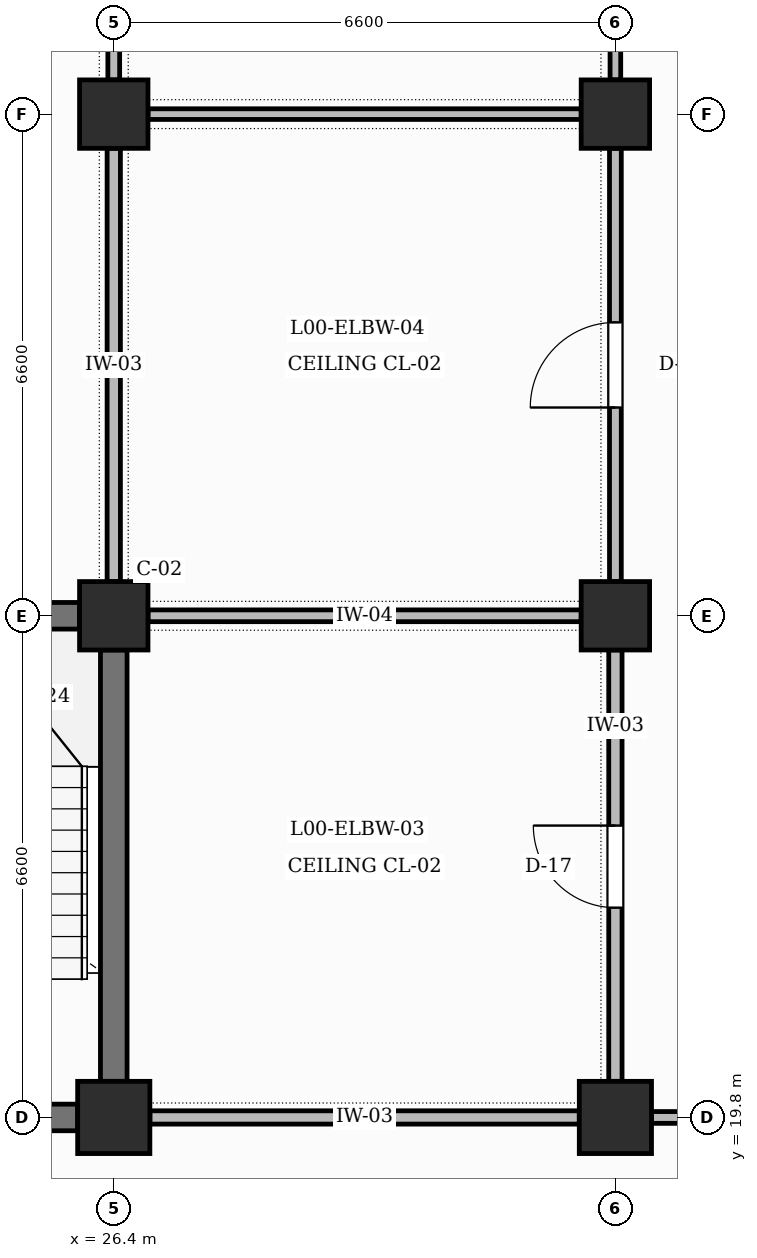
"""IFC4 building model, lengths in metres.
Left out: names, types, materials, properties, quantities, classifications, styles, units other than length and angle.
Written with IfcOpenShell. Run it as: python <this file> out.ifc"""

import sys

from ifc_helpers import new_model, si_unit, direction, frame, frame_2d, origin, origin_2d, place, context, subcontext, project, spatial, rectangle, extrude, element, fill, save


model = new_model("IFC4")
c1 = context("Model", 3, precision=1e-05, world=origin(), true_north=direction((0.0, 1.0)))
c2 = subcontext(c1, "Body", "Model", "MODEL_VIEW")
j1 = project(units=[si_unit("LENGTHUNIT", "METRE"), si_unit("PLANEANGLEUNIT", "RADIAN")], contexts=[c1])
p1 = place(None, origin())
s1 = spatial("IfcSite", under=j1, at=p1, CompositionType="ELEMENT")
p2 = place(p1, origin())
s2 = spatial("IfcBuilding", under=s1, at=p2, CompositionType="ELEMENT")
p3 = place(p2, origin())
s3 = spatial("IfcBuildingStorey", under=s2, at=p3, CompositionType="ELEMENT", Elevation=0.0)
p4 = place(p3, frame((26.4, 19.8, 0.0), z_axis=(0.0, 0.0, 1.0), x_axis=(1.0, 0.0, 0.0)))
e1 = element("IfcColumn", 1, at=p4, inside=s3, PredefinedType="COLUMN", context=c2, shape_type="SweptSolid", body=[
    extrude(rectangle(XDim=0.95, YDim=0.95, at=origin_2d()), origin(), (0.0, 0.0, 1.0), 5.4),
])
for number, where, z_axis, x_axis in (
    (2, (26.4, 26.4, 0.0), (0.0, 0.0, 1.0), (1.0, 0.0, 0.0)),
    (3, (26.4, 33.0, 0.0), (0.0, 0.0, 1.0), (1.0, 0.0, 0.0)),
):
    element("IfcColumn", number, at=place(p3, frame(where, z_axis=z_axis, x_axis=x_axis)), inside=s3, PredefinedType="COLUMN", context=c2, shape_type="SweptSolid", body=[
        extrude(rectangle(XDim=0.9, YDim=0.9, at=origin_2d()), origin(), (0.0, 0.0, 1.0), 5.4),
    ])
p5 = place(p3, frame((33.0, 19.8, 0.0), z_axis=(0.0, 0.0, 1.0), x_axis=(1.0, 0.0, 0.0)))
e4 = element("IfcColumn", 4, at=p5, inside=s3, PredefinedType="COLUMN", context=c2, shape_type="SweptSolid", body=[
    extrude(rectangle(XDim=0.95, YDim=0.95, at=origin_2d()), origin(), (0.0, 0.0, 1.0), 5.4),
])
for number, where, z_axis, x_axis in (
    (5, (33.0, 26.4, 0.0), (0.0, 0.0, 1.0), (1.0, 0.0, 0.0)),
    (6, (33.0, 33.0, 0.0), (0.0, 0.0, 1.0), (1.0, 0.0, 0.0)),
):
    element("IfcColumn", number, at=place(p3, frame(where, z_axis=z_axis, x_axis=x_axis)), inside=s3, PredefinedType="COLUMN", context=c2, shape_type="SweptSolid", body=[
        extrude(rectangle(XDim=0.9, YDim=0.9, at=origin_2d()), origin(), (0.0, 0.0, 1.0), 5.4),
    ])
p6 = place(p3, frame((20.275, 19.8, 0.0), z_axis=(0.0, 0.0, 1.0), x_axis=(1.0, 0.0, 0.0)))
e7 = element("IfcWall", 7, at=p6, inside=s3, PredefinedType="SHEAR", context=c2, shape_type="SweptSolid", body=[
    extrude(rectangle(XDim=5.65, YDim=0.35, at=frame_2d((2.825, 0.0))), origin(), (0.0, 0.0, 1.0), 4.2),
])
p7 = place(p6, frame((2.25, 0.0, 0.0)))
e8 = element("IfcOpeningElement", 8, at=p7, cuts=e7, PredefinedType="OPENING", context=c2, shape_type="SweptSolid", body=[
    extrude(rectangle(XDim=1.15, YDim=2.2, at=frame_2d((0.575, 1.1))), frame((0.0, 0.185, 0.0), z_axis=(0.0, -1.0, 0.0), x_axis=(1.0, 0.0, 0.0)), (0.0, 0.0, 1.0), 0.37),
])
for number, where, z_axis, x_axis in (
    (9, (20.275, 26.4, 0.0), (0.0, 0.0, 1.0), (1.0, 0.0, 0.0)),
    (10, (26.4, 20.275, 0.0), (0.0, 0.0, 1.0), (0.0, 1.0, 0.0)),
):
    element("IfcWall", number, at=place(p3, frame(where, z_axis=z_axis, x_axis=x_axis)), inside=s3, PredefinedType="SHEAR", context=c2, shape_type="SweptSolid", body=[
        extrude(rectangle(XDim=5.675, YDim=0.35, at=frame_2d((2.837, 0.0))), origin(), (0.0, 0.0, 1.0), 4.3),
    ])
p8 = place(p3, frame((26.4, 26.85, 0.0), z_axis=(0.0, 0.0, 1.0), x_axis=(0.0, 1.0, 0.0)))
e11 = element("IfcWall", 11, at=p8, inside=s3, PredefinedType="PARTITIONING", context=c2, shape_type="SweptSolid", body=[
    extrude(rectangle(XDim=5.7, YDim=0.175, at=frame_2d((2.85, 0.0))), origin(), (0.0, 0.0, 1.0), 4.3),
])
p9 = place(p3, frame((26.4, 33.45, 0.0), z_axis=(0.0, 0.0, 1.0), x_axis=(0.0, 1.0, 0.0)))
e12 = element("IfcWall", 12, at=p9, inside=s3, PredefinedType="PARTITIONING", context=c2, shape_type="SweptSolid", body=[
    extrude(rectangle(XDim=5.7, YDim=0.155, at=frame_2d((2.85, 0.0))), origin(), (0.0, 0.0, 1.0), 4.3),
])
p10 = place(p3, frame((26.875, 19.8, 0.0), z_axis=(0.0, 0.0, 1.0), x_axis=(1.0, 0.0, 0.0)))
e13 = element("IfcWall", 13, at=p10, inside=s3, PredefinedType="PARTITIONING", context=c2, shape_type="SweptSolid", body=[
    extrude(rectangle(XDim=5.65, YDim=0.175, at=frame_2d((2.825, 0.0))), origin(), (0.0, 0.0, 1.0), 4.3),
])
p11 = place(p3, frame((33.0, 20.275, 0.0), z_axis=(0.0, 0.0, 1.0), x_axis=(0.0, 1.0, 0.0)))
e14 = element("IfcWall", 14, at=p11, inside=s3, PredefinedType="PARTITIONING", context=c2, shape_type="SweptSolid", body=[
    extrude(rectangle(XDim=5.675, YDim=0.175, at=frame_2d((2.837, 0.0))), origin(), (0.0, 0.0, 1.0), 4.3),
])
p12 = place(p11, frame((2.285, 0.0, 0.0)))
e15 = element("IfcOpeningElement", 15, at=p12, cuts=e14, PredefinedType="OPENING", context=c2, shape_type="SweptSolid", body=[
    extrude(rectangle(XDim=1.08, YDim=2.15, at=frame_2d((0.54, 1.075))), frame((0.0, 0.097, 0.0), z_axis=(0.0, -1.0, 0.0), x_axis=(1.0, 0.0, 0.0)), (0.0, 0.0, 1.0), 0.195),
])
p13 = place(p3, frame((26.85, 26.4, 0.0), z_axis=(0.0, 0.0, 1.0), x_axis=(1.0, 0.0, 0.0)))
e16 = element("IfcWall", 16, at=p13, inside=s3, PredefinedType="PARTITIONING", context=c2, shape_type="SweptSolid", body=[
    extrude(rectangle(XDim=5.7, YDim=0.155, at=frame_2d((2.85, 0.0))), origin(), (0.0, 0.0, 1.0), 4.2),
])
p14 = place(p3, frame((33.0, 26.85, 0.0), z_axis=(0.0, 0.0, 1.0), x_axis=(0.0, 1.0, 0.0)))
e17 = element("IfcWall", 17, at=p14, inside=s3, PredefinedType="PARTITIONING", context=c2, shape_type="SweptSolid", body=[
    extrude(rectangle(XDim=5.7, YDim=0.155, at=frame_2d((2.85, 0.0))), origin(), (0.0, 0.0, 1.0), 4.3),
])
p15 = place(p14, frame((2.29, 0.0, 0.0)))
e18 = element("IfcOpeningElement", 18, at=p15, cuts=e17, PredefinedType="OPENING", context=c2, shape_type="SweptSolid", body=[
    extrude(rectangle(XDim=1.12, YDim=2.2, at=frame_2d((0.56, 1.1))), frame((0.0, 0.087, 0.0), z_axis=(0.0, -1.0, 0.0), x_axis=(1.0, 0.0, 0.0)), (0.0, 0.0, 1.0), 0.175),
])
p16 = place(p3, frame((26.85, 33.0, 0.0), z_axis=(0.0, 0.0, 1.0), x_axis=(1.0, 0.0, 0.0)))
e19 = element("IfcWall", 19, at=p16, inside=s3, PredefinedType="PARTITIONING", context=c2, shape_type="SweptSolid", body=[
    extrude(rectangle(XDim=5.7, YDim=0.14, at=frame_2d((2.85, 0.0))), origin(), (0.0, 0.0, 1.0), 4.3),
])
p17 = place(p3, frame((33.0, 33.45, 0.0), z_axis=(0.0, 0.0, 1.0), x_axis=(0.0, 1.0, 0.0)))
e20 = element("IfcWall", 20, at=p17, inside=s3, PredefinedType="PARTITIONING", context=c2, shape_type="SweptSolid", body=[
    extrude(rectangle(XDim=5.7, YDim=0.14, at=frame_2d((2.85, 0.0))), origin(), (0.0, 0.0, 1.0), 4.3),
])
p18 = place(p17, frame((2.26, 0.0, 0.0)))
e21 = element("IfcOpeningElement", 21, at=p18, cuts=e20, PredefinedType="OPENING", context=c2, shape_type="SweptSolid", body=[
    extrude(rectangle(XDim=1.18, YDim=2.2, at=frame_2d((0.59, 1.1))), frame((0.0, 0.08, 0.0), z_axis=(0.0, -1.0, 0.0), x_axis=(1.0, 0.0, 0.0)), (0.0, 0.0, 1.0), 0.16),
])
p19 = place(p3, frame((33.475, 19.8, 0.0), z_axis=(0.0, 0.0, 1.0), x_axis=(1.0, 0.0, 0.0)))
e22 = element("IfcWall", 22, at=p19, inside=s3, PredefinedType="PARTITIONING", context=c2, shape_type="SweptSolid", body=[
    extrude(rectangle(XDim=5.675, YDim=0.155, at=frame_2d((2.837, 0.0))), origin(), (0.0, 0.0, 1.0), 4.2),
])
p20 = place(p19, frame((1.925, 0.0, 0.0)))
e23 = element("IfcOpeningElement", 23, at=p20, cuts=e22, PredefinedType="OPENING", context=c2, shape_type="SweptSolid", body=[
    extrude(rectangle(XDim=1.8, YDim=2.3, at=frame_2d((0.9, 1.15))), frame((0.0, 0.087, 0.0), z_axis=(0.0, -1.0, 0.0), x_axis=(1.0, 0.0, 0.0)), (0.0, 0.0, 1.0), 0.175),
])
p21 = place(p12, origin())
e24 = element("IfcDoor", 24, at=p21, inside=s3, OperationType="SINGLE_SWING_RIGHT", PredefinedType="DOOR", context=c2, shape_type="SweptSolid", body=[
    extrude(rectangle(XDim=1.08, YDim=2.15, at=frame_2d((0.54, 1.075))), frame((0.0, 0.025, 0.0), z_axis=(0.0, -1.0, 0.0), x_axis=(1.0, 0.0, 0.0)), (0.0, 0.0, 1.0), 0.05),
])
fill(e15, e24)
p22 = place(p15, origin())
e25 = element("IfcDoor", 25, at=p22, inside=s3, OperationType="SINGLE_SWING_LEFT", PredefinedType="DOOR", context=c2, shape_type="SweptSolid", body=[
    extrude(rectangle(XDim=1.12, YDim=2.2, at=frame_2d((0.56, 1.1))), frame((0.0, 0.025, 0.0), z_axis=(0.0, -1.0, 0.0), x_axis=(1.0, 0.0, 0.0)), (0.0, 0.0, 1.0), 0.05),
])
fill(e18, e25)
save(model, sys.argv[1])
